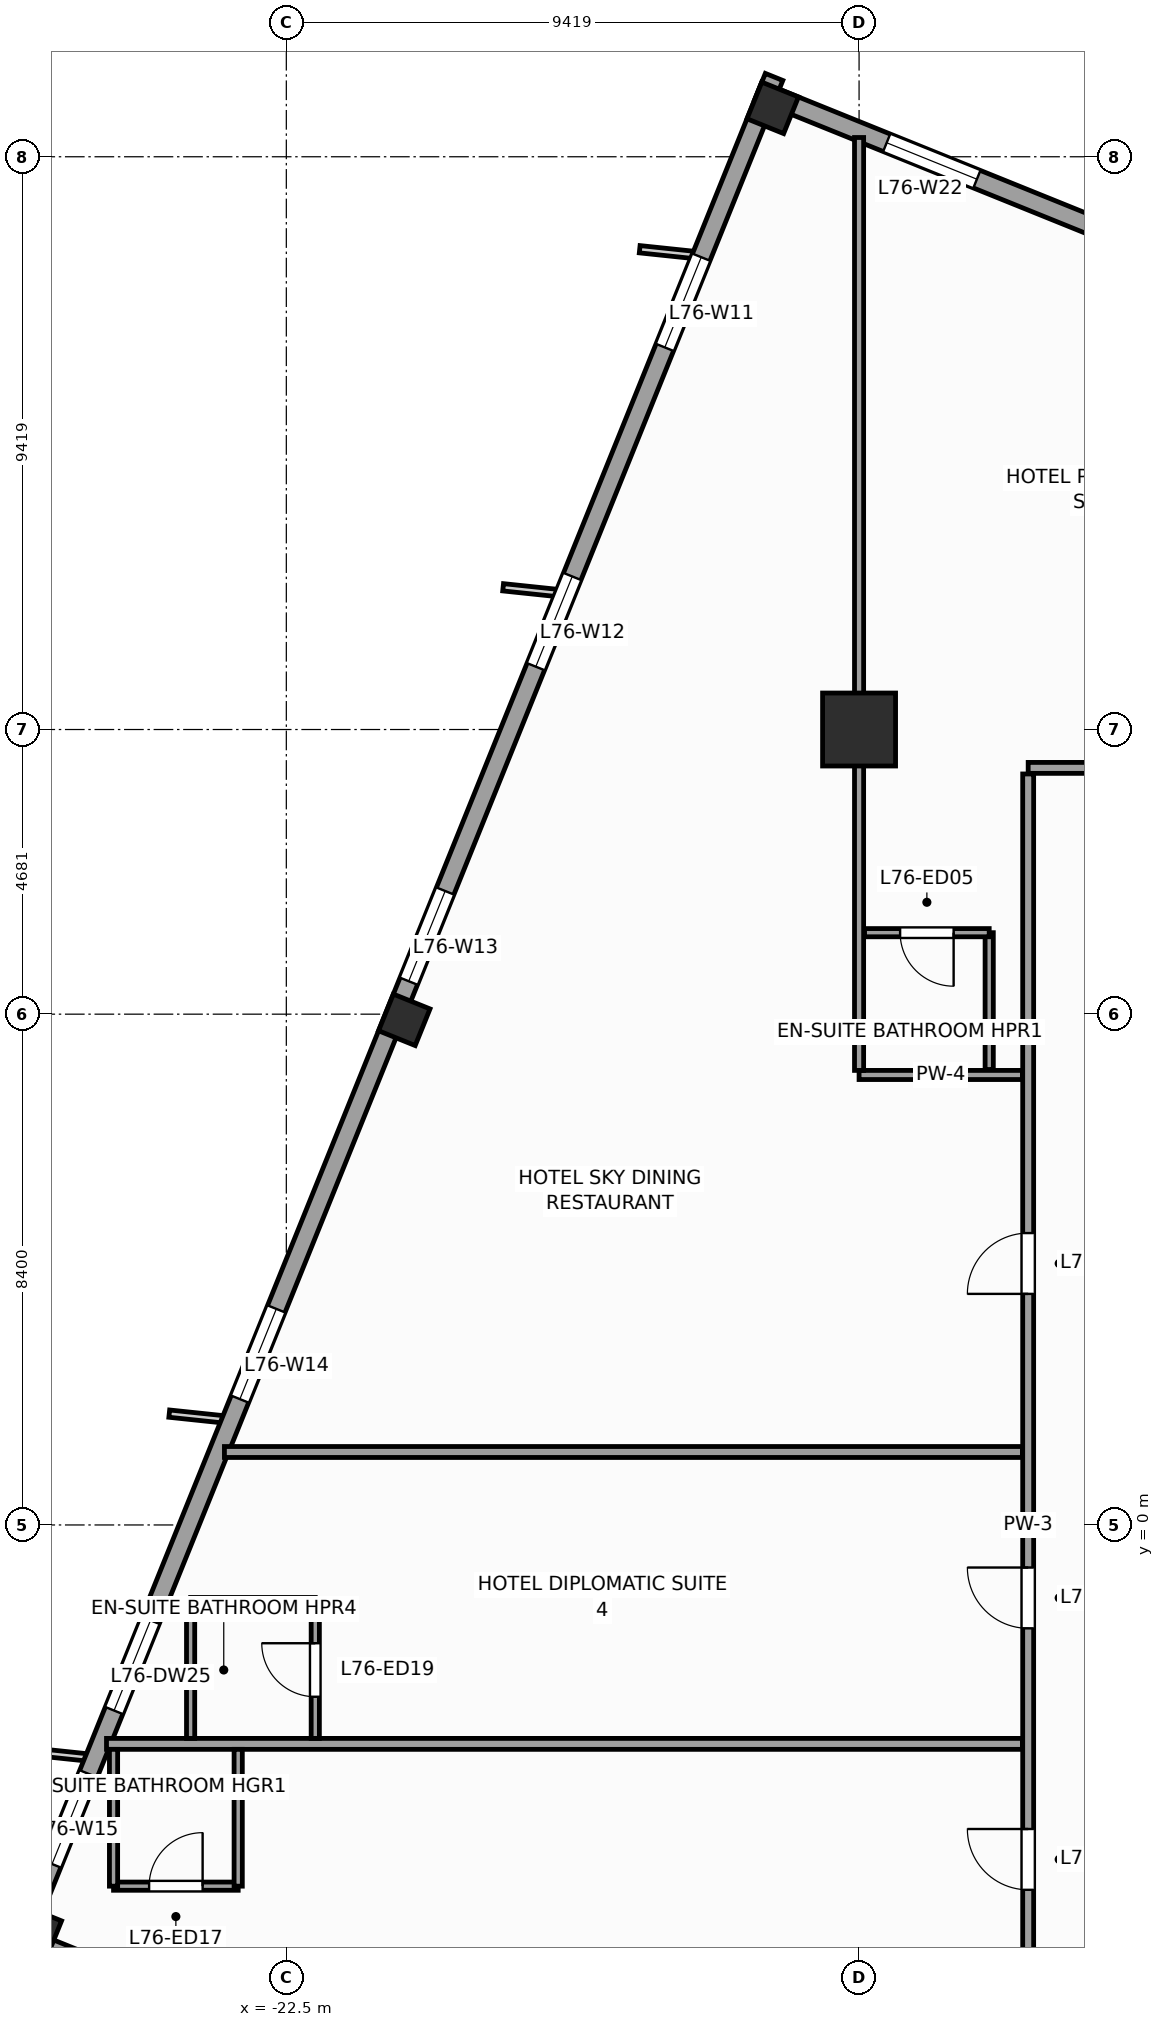
"""IFC4 building model, lengths in metres.
Left out: names, types, materials, properties, quantities, classifications, styles, units other than length and angle.
Written with IfcOpenShell. Run it as: python <this file> out.ifc"""

import sys

from ifc_helpers import new_model, si_unit, direction, frame, frame_2d, origin, origin_2d, place, context, subcontext, project, spatial, rectangle, extrude, source, transform, mapped, element, fill, save


model = new_model("IFC4")
c1 = context("Model", 3, precision=1e-05, world=origin(), true_north=direction((0.0, 1.0)))
c2 = subcontext(c1, "Body", "Model", "MODEL_VIEW")
j1 = project(units=[si_unit("LENGTHUNIT", "METRE"), si_unit("PLANEANGLEUNIT", "RADIAN")], contexts=[c1])
p1 = place(None, origin())
s1 = spatial("IfcSite", under=j1, at=p1, CompositionType="ELEMENT")
p2 = place(p1, origin())
s2 = spatial("IfcBuilding", under=s1, at=p2, CompositionType="ELEMENT")
p3 = place(p2, frame((0.0, 0.0, 308.4)))
s3 = spatial("IfcBuildingStorey", under=s2, at=p3, CompositionType="ELEMENT", Elevation=308.4)
m1 = source(origin(), c2, "Body", "SweptSolid", [
    extrude(rectangle(XDim=1.2, YDim=1.2, at=origin_2d()), origin(), (0.0, 0.0, 1.0), 3.6),
])
p4 = place(p3, frame((-13.081, 13.081, 0.0), z_axis=(0.0, 0.0, 1.0), x_axis=(1.0, 0.0, 0.0)))
e1 = element("IfcColumn", 1, at=p4, inside=s3, PredefinedType="COLUMN", context=c2, shape_type="MappedRepresentation", body=[
    mapped(m1, transform((0.0, 0.0, 0.0), scale=1.0)),
])
m2 = source(origin(), c2, "Body", "SweptSolid", [
    extrude(rectangle(XDim=0.65, YDim=0.65, at=origin_2d()), origin(), (0.0, 0.0, 1.0), 3.6),
])
for number, where, z_axis, x_axis in (
    (2, (-14.501, 23.304, 0.0), (0.0, 0.0, 1.0), (0.375, 0.927, 0.0)),
    (3, (-20.56, 8.307, 0.0), (0.0, 0.0, 1.0), (0.375, 0.927, 0.0)),
    (4, (-26.62, -6.69, 0.0), (0.0, 0.0, 1.0), (0.375, 0.927, 0.0)),
):
    element("IfcColumn", number, at=place(p3, frame(where, z_axis=z_axis, x_axis=x_axis)), inside=s3, PredefinedType="COLUMN", context=c2, shape_type="MappedRepresentation", body=[
        mapped(m2, transform((0.0, 0.0, 0.0), scale=1.0)),
    ])
p5 = place(p3, frame((-9.032, 21.278, 0.0), z_axis=(0.0, 0.0, 1.0), x_axis=(-0.927185411764, 0.374602739196, 0.0)))
e5 = element("IfcWall", 5, at=p5, inside=s3, PredefinedType="STANDARD", context=c2, shape_type="SweptSolid", body=[
    extrude(rectangle(XDim=6.155, YDim=0.31, at=frame_2d((3.078, 0.0))), origin(), (0.0, 0.0, 1.0), 3.35),
])
p6 = place(p5, frame((2.278, 0.0, 0.47)))
e6 = element("IfcOpeningElement", 6, at=p6, cuts=e5, PredefinedType="OPENING", context=c2, shape_type="SweptSolid", body=[
    extrude(rectangle(XDim=1.6, YDim=2.1, at=frame_2d((0.8, 1.05))), frame((0.0, 0.165, 0.0), z_axis=(0.0, -1.0, 0.0), x_axis=(1.0, 0.0, 0.0)), (0.0, 0.0, 1.0), 0.33),
])
p7 = place(p3, frame((-14.479, 23.813, 0.0), z_axis=(0.0, 0.0, 1.0), x_axis=(-0.374609557019, -0.927182657188, 0.0)))
e7 = element("IfcWall", 7, at=p7, inside=s3, PredefinedType="STANDARD", context=c2, shape_type="SweptSolid", body=[
    extrude(rectangle(XDim=33.31, YDim=0.31, at=frame_2d((16.655, 0.0))), origin(), (0.0, 0.0, 1.0), 2.75),
])
p8 = place(p7, frame((3.197, 0.0, 0.47)))
e8 = element("IfcOpeningElement", 8, at=p8, cuts=e7, PredefinedType="OPENING", context=c2, shape_type="SweptSolid", body=[
    extrude(rectangle(XDim=1.6, YDim=2.1, at=frame_2d((0.8, 1.05))), frame((0.0, 0.165, 0.0), z_axis=(0.0, -1.0, 0.0), x_axis=(1.0, 0.0, 0.0)), (0.0, 0.0, 1.0), 0.33),
])
p9 = place(p7, frame((8.86, 0.0, 0.47)))
e9 = element("IfcOpeningElement", 9, at=p9, cuts=e7, PredefinedType="OPENING", context=c2, shape_type="SweptSolid", body=[
    extrude(rectangle(XDim=1.6, YDim=2.1, at=frame_2d((0.8, 1.05))), frame((0.0, 0.165, 0.0), z_axis=(0.0, -1.0, 0.0), x_axis=(1.0, 0.0, 0.0)), (0.0, 0.0, 1.0), 0.33),
])
p10 = place(p7, frame((14.439, 0.0, 0.47)))
e10 = element("IfcOpeningElement", 10, at=p10, cuts=e7, PredefinedType="OPENING", context=c2, shape_type="SweptSolid", body=[
    extrude(rectangle(XDim=1.6, YDim=2.1, at=frame_2d((0.8, 1.05))), frame((0.0, 0.165, 0.0), z_axis=(0.0, -1.0, 0.0), x_axis=(1.0, 0.0, 0.0)), (0.0, 0.0, 1.0), 0.33),
])
p11 = place(p7, frame((21.851, 0.0, 0.47)))
e11 = element("IfcOpeningElement", 11, at=p11, cuts=e7, PredefinedType="OPENING", context=c2, shape_type="SweptSolid", body=[
    extrude(rectangle(XDim=1.6, YDim=2.1, at=frame_2d((0.8, 1.05))), frame((0.0, 0.165, 0.0), z_axis=(0.0, -1.0, 0.0), x_axis=(1.0, 0.0, 0.0)), (0.0, 0.0, 1.0), 0.33),
])
p12 = place(p7, frame((30.097, 0.0, 0.47)))
e12 = element("IfcOpeningElement", 12, at=p12, cuts=e7, PredefinedType="OPENING", context=c2, shape_type="SweptSolid", body=[
    extrude(rectangle(XDim=1.6, YDim=2.1, at=frame_2d((0.8, 1.05))), frame((0.0, 0.165, 0.0), z_axis=(0.0, -1.0, 0.0), x_axis=(1.0, 0.0, 0.0)), (0.0, 0.0, 1.0), 0.33),
])
p13 = place(p7, frame((27.374, 0.0, 0.47)))
e13 = element("IfcOpeningElement", 13, at=p13, cuts=e7, PredefinedType="OPENING", context=c2, shape_type="SweptSolid", body=[
    extrude(rectangle(XDim=1.6, YDim=2.1, at=frame_2d((0.8, 1.05))), frame((0.0, 0.165, 0.0), z_axis=(0.0, -1.0, 0.0), x_axis=(1.0, 0.0, 0.0)), (0.0, 0.0, 1.0), 0.33),
])
p14 = place(p3, frame((-26.841, -6.784, 0.0), z_axis=(0.0, 0.0, 1.0), x_axis=(0.927171722085, -0.374636620962, 0.0)))
e14 = element("IfcWall", 14, at=p14, inside=s3, PredefinedType="STANDARD", context=c2, shape_type="SweptSolid", body=[
    extrude(rectangle(XDim=6.0, YDim=0.31, at=frame_2d((3.0, 0.0))), origin(), (0.0, 0.0, 1.0), 2.65),
])
p15 = place(p3, frame((-10.3, 12.45, 0.0), z_axis=(0.0, 0.0, 1.0), x_axis=(1.0, 0.0, 0.0)))
e15 = element("IfcWall", 15, at=p15, inside=s3, PredefinedType="PARTITIONING", context=c2, shape_type="SweptSolid", body=[
    extrude(rectangle(XDim=20.6, YDim=0.18, at=frame_2d((10.3, 0.0))), origin(), (0.0, 0.0, 1.0), 3.35),
])
p16 = place(p15, frame((15.036, 0.0, 0.0)))
e16 = element("IfcOpeningElement", 16, at=p16, cuts=e15, PredefinedType="OPENING", context=c2, shape_type="SweptSolid", body=[
    extrude(rectangle(XDim=0.95, YDim=2.1, at=frame_2d((0.475, 1.05))), frame((0.0, 0.1, 0.0), z_axis=(0.0, -1.0, 0.0), x_axis=(1.0, 0.0, 0.0)), (0.0, 0.0, 1.0), 0.2),
])
p17 = place(p15, frame((3.314, 0.0, 0.0)))
e17 = element("IfcOpeningElement", 17, at=p17, cuts=e15, PredefinedType="OPENING", context=c2, shape_type="SweptSolid", body=[
    extrude(rectangle(XDim=1.0, YDim=2.15, at=frame_2d((0.5, 1.075))), frame((0.0, 0.1, 0.0), z_axis=(0.0, -1.0, 0.0), x_axis=(1.0, 0.0, 0.0)), (0.0, 0.0, 1.0), 0.2),
])
p18 = place(p15, frame((10.05, 0.0, 0.0)))
e18 = element("IfcOpeningElement", 18, at=p18, cuts=e15, PredefinedType="OPENING", context=c2, shape_type="SweptSolid", body=[
    extrude(rectangle(XDim=1.0, YDim=2.15, at=frame_2d((0.5, 1.075))), frame((0.0, 0.1, 0.0), z_axis=(0.0, -1.0, 0.0), x_axis=(1.0, 0.0, 0.0)), (0.0, 0.0, 1.0), 0.2),
])
p19 = place(p3, frame((-10.3, -12.35, 0.0), z_axis=(0.0, 0.0, 1.0), x_axis=(0.0, 1.0, 0.0)))
e19 = element("IfcWall", 19, at=p19, inside=s3, PredefinedType="PARTITIONING", context=c2, shape_type="SweptSolid", body=[
    extrude(rectangle(XDim=24.7, YDim=0.18, at=frame_2d((12.35, 0.0))), origin(), (0.0, 0.0, 1.0), 3.35),
])
p20 = place(p19, frame((16.15, 0.0, 0.0)))
e20 = element("IfcOpeningElement", 20, at=p20, cuts=e19, PredefinedType="OPENING", context=c2, shape_type="SweptSolid", body=[
    extrude(rectangle(XDim=1.0, YDim=2.15, at=frame_2d((0.5, 1.075))), frame((0.0, 0.1, 0.0), z_axis=(0.0, -1.0, 0.0), x_axis=(1.0, 0.0, 0.0)), (0.0, 0.0, 1.0), 0.2),
])
p21 = place(p19, frame((2.139, 0.0, 0.0)))
e21 = element("IfcOpeningElement", 21, at=p21, cuts=e19, PredefinedType="OPENING", context=c2, shape_type="SweptSolid", body=[
    extrude(rectangle(XDim=1.0, YDim=2.15, at=frame_2d((0.5, 1.075))), frame((0.0, 0.1, 0.0), z_axis=(0.0, -1.0, 0.0), x_axis=(1.0, 0.0, 0.0)), (0.0, 0.0, 1.0), 0.2),
])
p22 = place(p19, frame((6.35, 0.0, 0.0)))
e22 = element("IfcOpeningElement", 22, at=p22, cuts=e19, PredefinedType="OPENING", context=c2, shape_type="SweptSolid", body=[
    extrude(rectangle(XDim=1.0, YDim=2.15, at=frame_2d((0.5, 1.075))), frame((0.0, 0.1, 0.0), z_axis=(0.0, -1.0, 0.0), x_axis=(1.0, 0.0, 0.0)), (0.0, 0.0, 1.0), 0.2),
])
p23 = place(p19, frame((10.65, 0.0, 0.0)))
e23 = element("IfcOpeningElement", 23, at=p23, cuts=e19, PredefinedType="OPENING", context=c2, shape_type="SweptSolid", body=[
    extrude(rectangle(XDim=1.0, YDim=2.15, at=frame_2d((0.5, 1.075))), frame((0.0, 0.1, 0.0), z_axis=(0.0, -1.0, 0.0), x_axis=(1.0, 0.0, 0.0)), (0.0, 0.0, 1.0), 0.2),
])
p24 = place(p3, frame((-10.395, -3.6, 0.0), z_axis=(0.0, 0.0, 1.0), x_axis=(-1.0, 0.0, 0.0)))
e24 = element("IfcWall", 24, at=p24, inside=s3, PredefinedType="PARTITIONING", context=c2, shape_type="SweptSolid", body=[
    extrude(rectangle(XDim=15.062, YDim=0.18, at=frame_2d((7.531, 0.0))), origin(), (0.0, 0.0, 1.0), 3.35),
])
p25 = place(p3, frame((-10.395, 1.2, 0.0), z_axis=(0.0, 0.0, 1.0), x_axis=(-1.0, 0.0, 0.0)))
e25 = element("IfcWall", 25, at=p25, inside=s3, PredefinedType="PARTITIONING", context=c2, shape_type="SweptSolid", body=[
    extrude(rectangle(XDim=13.123, YDim=0.18, at=frame_2d((6.562, 0.0))), origin(), (0.0, 0.0, 1.0), 3.35),
])
p26 = place(p3, frame((-10.395, 7.4, 0.0), z_axis=(0.0, 0.0, 1.0), x_axis=(-1.0, 0.0, 0.0)))
e26 = element("IfcWall", 26, at=p26, inside=s3, PredefinedType="PARTITIONING", context=c2, shape_type="SweptSolid", body=[
    extrude(rectangle(XDim=2.686, YDim=0.15, at=frame_2d((1.343, 0.0))), origin(), (0.0, 0.0, 1.0), 3.35),
])
p27 = place(p3, frame((-13.081, 7.475, 0.0), z_axis=(0.0, 0.0, 1.0), x_axis=(0.0, 1.0, 0.0)))
e27 = element("IfcWall", 27, at=p27, inside=s3, PredefinedType="PARTITIONING", context=c2, shape_type="SweptSolid", body=[
    extrude(rectangle(XDim=15.342, YDim=0.15, at=frame_2d((7.671, 0.0))), origin(), (0.0, 0.0, 1.0), 2.45),
])
p28 = place(p3, frame((-10.941, 7.49, 0.0), z_axis=(0.0, 0.0, 1.0), x_axis=(0.0, 1.0, 0.0)))
e28 = element("IfcWall", 28, at=p28, inside=s3, PredefinedType="PARTITIONING", context=c2, shape_type="SweptSolid", body=[
    extrude(rectangle(XDim=2.25, YDim=0.135, at=frame_2d((1.125, 0.0))), origin(), (0.0, 0.0, 1.0), 3.35),
])
p29 = place(p3, frame((-12.991, 9.74, 0.0), z_axis=(0.0, 0.0, 1.0), x_axis=(1.0, 0.0, 0.0)))
e29 = element("IfcWall", 29, at=p29, inside=s3, PredefinedType="PARTITIONING", context=c2, shape_type="SweptSolid", body=[
    extrude(rectangle(XDim=2.05, YDim=0.135, at=frame_2d((1.025, 0.0))), origin(), (0.0, 0.0, 1.0), 3.35),
])
p30 = place(p29, frame((0.585, 0.0, 0.0)))
e30 = element("IfcOpeningElement", 30, at=p30, cuts=e29, PredefinedType="OPENING", context=c2, shape_type="SweptSolid", body=[
    extrude(rectangle(XDim=0.88, YDim=2.1, at=frame_2d((0.44, 1.05))), frame((0.0, 0.078, 0.0), z_axis=(0.0, -1.0, 0.0), x_axis=(1.0, 0.0, 0.0)), (0.0, 0.0, 1.0), 0.155),
])
p31 = place(p3, frame((-25.342, -5.94, 0.0), z_axis=(0.0, 0.0, 1.0), x_axis=(1.0, 0.0, 0.0)))
e31 = element("IfcWall", 31, at=p31, inside=s3, PredefinedType="PARTITIONING", context=c2, shape_type="SweptSolid", body=[
    extrude(rectangle(XDim=2.05, YDim=0.135, at=frame_2d((1.025, 0.0))), origin(), (0.0, 0.0, 1.0), 3.35),
])
p32 = place(p31, frame((0.585, 0.0, 0.0)))
e32 = element("IfcOpeningElement", 32, at=p32, cuts=e31, PredefinedType="OPENING", context=c2, shape_type="SweptSolid", body=[
    extrude(rectangle(XDim=0.88, YDim=2.1, at=frame_2d((0.44, 1.05))), frame((0.0, 0.078, 0.0), z_axis=(0.0, -1.0, 0.0), x_axis=(1.0, 0.0, 0.0)), (0.0, 0.0, 1.0), 0.155),
])
p33 = place(p3, frame((-23.292, -5.94, 0.0), z_axis=(0.0, 0.0, 1.0), x_axis=(0.0, 1.0, 0.0)))
e33 = element("IfcWall", 33, at=p33, inside=s3, PredefinedType="PARTITIONING", context=c2, shape_type="SweptSolid", body=[
    extrude(rectangle(XDim=2.25, YDim=0.135, at=frame_2d((1.125, 0.0))), origin(), (0.0, 0.0, 1.0), 2.95),
])
p34 = place(p3, frame((-25.342, -5.94, 0.0), z_axis=(0.0, 0.0, 1.0), x_axis=(0.0, 1.0, 0.0)))
e34 = element("IfcWall", 34, at=p34, inside=s3, PredefinedType="PARTITIONING", context=c2, shape_type="SweptSolid", body=[
    extrude(rectangle(XDim=2.25, YDim=0.135, at=frame_2d((1.125, 0.0))), origin(), (0.0, 0.0, 1.0), 2.75),
])
p35 = place(p3, frame((-22.024, -3.51, 0.0), z_axis=(0.0, 0.0, 1.0), x_axis=(0.0, 1.0, 0.0)))
e35 = element("IfcWall", 35, at=p35, inside=s3, PredefinedType="PARTITIONING", context=c2, shape_type="SweptSolid", body=[
    extrude(rectangle(XDim=2.25, YDim=0.135, at=frame_2d((1.125, 0.0))), origin(), (0.0, 0.0, 1.0), 3.35),
])
p36 = place(p35, frame((0.685, 0.0, 0.0)))
e36 = element("IfcOpeningElement", 36, at=p36, cuts=e35, PredefinedType="OPENING", context=c2, shape_type="SweptSolid", body=[
    extrude(rectangle(XDim=0.88, YDim=2.1, at=frame_2d((0.44, 1.05))), frame((0.0, 0.078, 0.0), z_axis=(0.0, -1.0, 0.0), x_axis=(1.0, 0.0, 0.0)), (0.0, 0.0, 1.0), 0.155),
])
p37 = place(p3, frame((-24.074, -1.26, 0.0), z_axis=(0.0, 0.0, 1.0), x_axis=(1.0, 0.0, 0.0)))
e37 = element("IfcWall", 37, at=p37, inside=s3, PredefinedType="PARTITIONING", context=c2, shape_type="SweptSolid", body=[
    extrude(rectangle(XDim=2.05, YDim=0.135, at=frame_2d((1.025, 0.0))), origin(), (0.0, 0.0, 1.0), 3.35),
])
p38 = place(p3, frame((-24.074, -3.51, 0.0), z_axis=(0.0, 0.0, 1.0), x_axis=(0.0, 1.0, 0.0)))
e38 = element("IfcWall", 38, at=p38, inside=s3, PredefinedType="PARTITIONING", context=c2, shape_type="SweptSolid", body=[
    extrude(rectangle(XDim=2.25, YDim=0.135, at=frame_2d((1.125, 0.0))), origin(), (0.0, 0.0, 1.0), 3.35),
])
m3 = source(origin(), c2, "Body", "SweptSolid", [
    extrude(rectangle(XDim=1.6, YDim=2.1, at=frame_2d((0.8, 1.05))), frame((0.0, 0.03, 0.0), z_axis=(0.0, -1.0, 0.0), x_axis=(1.0, 0.0, 0.0)), (0.0, 0.0, 1.0), 0.06),
])
p39 = place(p8, origin())
e39 = element("IfcWindow", 39, at=p39, inside=s3, PartitioningType="SINGLE_PANEL", PredefinedType="WINDOW", context=c2, shape_type="MappedRepresentation", body=[
    mapped(m3, transform((0.0, 0.0, 0.0), scale=1.0)),
])
fill(e8, e39)
p40 = place(p9, origin())
e40 = element("IfcWindow", 40, at=p40, inside=s3, PartitioningType="SINGLE_PANEL", PredefinedType="WINDOW", context=c2, shape_type="MappedRepresentation", body=[
    mapped(m3, transform((0.0, 0.0, 0.0), scale=1.0)),
])
fill(e9, e40)
p41 = place(p10, origin())
e41 = element("IfcWindow", 41, at=p41, inside=s3, PartitioningType="SINGLE_PANEL", PredefinedType="WINDOW", context=c2, shape_type="MappedRepresentation", body=[
    mapped(m3, transform((0.0, 0.0, 0.0), scale=1.0)),
])
fill(e10, e41)
p42 = place(p11, origin())
e42 = element("IfcWindow", 42, at=p42, inside=s3, PartitioningType="SINGLE_PANEL", PredefinedType="WINDOW", context=c2, shape_type="MappedRepresentation", body=[
    mapped(m3, transform((0.0, 0.0, 0.0), scale=1.0)),
])
fill(e11, e42)
p43 = place(p12, origin())
e43 = element("IfcWindow", 43, at=p43, inside=s3, PartitioningType="SINGLE_PANEL", PredefinedType="WINDOW", context=c2, shape_type="MappedRepresentation", body=[
    mapped(m3, transform((0.0, 0.0, 0.0), scale=1.0)),
])
fill(e12, e43)
p44 = place(p6, origin())
e44 = element("IfcWindow", 44, at=p44, inside=s3, PartitioningType="SINGLE_PANEL", PredefinedType="WINDOW", context=c2, shape_type="MappedRepresentation", body=[
    mapped(m3, transform((0.0, 0.0, 0.0), scale=1.0)),
])
fill(e6, e44)
m4 = source(origin(), c2, "Body", "SweptSolid", [
    extrude(rectangle(XDim=1.0, YDim=2.15, at=frame_2d((0.5, 1.075))), frame((0.0, 0.025, 0.0), z_axis=(0.0, -1.0, 0.0), x_axis=(1.0, 0.0, 0.0)), (0.0, 0.0, 1.0), 0.05),
])
p45 = place(p20, origin())
e45 = element("IfcDoor", 45, at=p45, inside=s3, OperationType="SINGLE_SWING_LEFT", PredefinedType="DOOR", context=c2, shape_type="MappedRepresentation", body=[
    mapped(m4, transform((0.0, 0.0, 0.0), scale=1.0)),
])
fill(e20, e45)
m5 = source(origin(), c2, "Body", "SweptSolid", [
    extrude(rectangle(XDim=0.88, YDim=2.1, at=frame_2d((0.44, 1.05))), frame((0.0, 0.025, 0.0), z_axis=(0.0, -1.0, 0.0), x_axis=(1.0, 0.0, 0.0)), (0.0, 0.0, 1.0), 0.05),
])
p46 = place(p30, frame((0.88, 0.0, 0.0), z_axis=(0.0, 0.0, 1.0), x_axis=(-1.0, 0.0, 0.0)))
e46 = element("IfcDoor", 46, at=p46, inside=s3, OperationType="SINGLE_SWING_RIGHT", PredefinedType="DOOR", context=c2, shape_type="MappedRepresentation", body=[
    mapped(m5, transform((0.0, 0.0, 0.0), scale=1.0)),
])
fill(e30, e46)
p47 = place(p22, origin())
e47 = element("IfcDoor", 47, at=p47, inside=s3, OperationType="SINGLE_SWING_RIGHT", PredefinedType="DOOR", context=c2, shape_type="MappedRepresentation", body=[
    mapped(m4, transform((0.0, 0.0, 0.0), scale=1.0)),
])
fill(e22, e47)
p48 = place(p32, origin())
e48 = element("IfcDoor", 48, at=p48, inside=s3, OperationType="SINGLE_SWING_RIGHT", PredefinedType="DOOR", context=c2, shape_type="MappedRepresentation", body=[
    mapped(m5, transform((0.0, 0.0, 0.0), scale=1.0)),
])
fill(e32, e48)
p49 = place(p23, origin())
e49 = element("IfcDoor", 49, at=p49, inside=s3, OperationType="SINGLE_SWING_RIGHT", PredefinedType="DOOR", context=c2, shape_type="MappedRepresentation", body=[
    mapped(m4, transform((0.0, 0.0, 0.0), scale=1.0)),
])
fill(e23, e49)
p50 = place(p36, origin())
e50 = element("IfcDoor", 50, at=p50, inside=s3, OperationType="SINGLE_SWING_RIGHT", PredefinedType="DOOR", context=c2, shape_type="MappedRepresentation", body=[
    mapped(m5, transform((0.0, 0.0, 0.0), scale=1.0)),
])
fill(e36, e50)
p51 = place(p13, origin())
e51 = element("IfcWindow", 51, at=p51, inside=s3, PartitioningType="SINGLE_PANEL", PredefinedType="WINDOW", context=c2, shape_type="MappedRepresentation", body=[
    mapped(m3, transform((0.0, 0.0, 0.0), scale=1.0)),
])
fill(e13, e51)
save(model, sys.argv[1])
